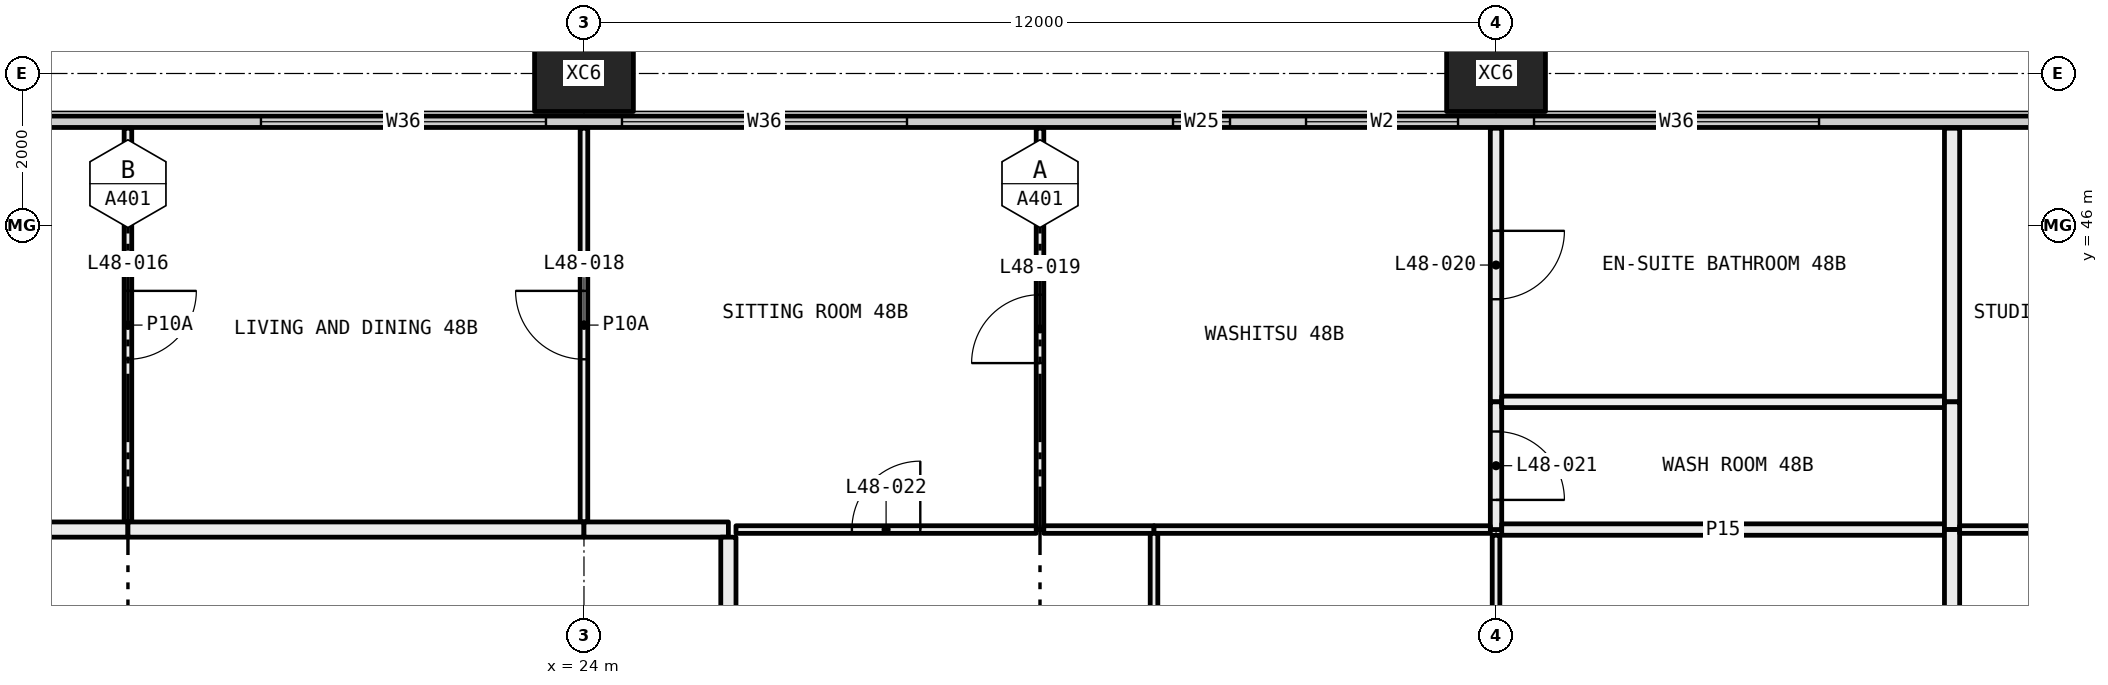
"""IFC4 building model, lengths in metres.
Left out: names, types, materials, properties, quantities, classifications, styles, units other than length and angle.
Written with IfcOpenShell. Run it as: python <this file> out.ifc"""

import sys

from ifc_helpers import new_model, si_unit, direction, frame, frame_2d, origin, origin_2d, place, context, subcontext, project, spatial, rectangle, hollow_rectangle, extrude, element, fill, save


model = new_model("IFC4")
c1 = context("Model", 3, precision=1e-05, world=origin(), true_north=direction((0.0, 1.0)))
c2 = subcontext(c1, "Body", "Model", "MODEL_VIEW")
j1 = project(units=[si_unit("LENGTHUNIT", "METRE"), si_unit("PLANEANGLEUNIT", "RADIAN")], contexts=[c1])
p1 = place(None, origin())
s1 = spatial("IfcSite", under=j1, at=p1, CompositionType="ELEMENT")
p2 = place(p1, origin())
s2 = spatial("IfcBuilding", under=s1, at=p2, CompositionType="ELEMENT")
p3 = place(p2, frame((0.0, 0.0, 182.4)))
s3 = spatial("IfcBuildingStorey", under=s2, at=p3, CompositionType="ELEMENT", Elevation=182.4)
for number, where, z_axis, x_axis in (
    (1, (24.0, 48.0, -0.4), (0.0, 0.0, 1.0), (1.0, 0.0, 0.0)),
    (2, (36.0, 48.0, -0.4), (0.0, 0.0, 1.0), (1.0, 0.0, 0.0)),
):
    element("IfcColumn", number, at=place(p3, frame(where, z_axis=z_axis, x_axis=x_axis)), inside=s3, PredefinedType="COLUMN", context=c2, shape_type="SweptSolid", body=[
        extrude(hollow_rectangle(XDim=1.3, YDim=1.0, WallThickness=0.05, at=origin_2d()), origin(), (0.0, 0.0, 1.0), 3.45),
    ])
p4 = place(p3, frame((6.56, 47.365, 0.0), z_axis=(0.0, 0.0, 1.0), x_axis=(1.0, 0.0, 0.0)))
e3 = element("IfcWall", 3, at=p4, inside=s3, PredefinedType="ELEMENTEDWALL", context=c2, shape_type="SweptSolid", body=[
    extrude(rectangle(XDim=46.88, YDim=0.15, at=frame_2d((23.44, 0.0))), origin(), (0.0, 0.0, 1.0), 3.05),
])
p5 = place(p4, frame((0.44, 0.0, 0.45)))
e4 = element("IfcOpeningElement", 4, at=p5, cuts=e3, PredefinedType="OPENING", context=c2, shape_type="SweptSolid", body=[
    extrude(rectangle(XDim=4.5, YDim=2.55, at=frame_2d((2.25, 1.275))), frame((0.0, 0.085, 0.0), z_axis=(0.0, -1.0, 0.0), x_axis=(1.0, 0.0, 0.0)), (0.0, 0.0, 1.0), 0.17),
])
p6 = place(p4, frame((5.94, 0.0, 0.45)))
e5 = element("IfcOpeningElement", 5, at=p6, cuts=e3, PredefinedType="OPENING", context=c2, shape_type="SweptSolid", body=[
    extrude(rectangle(XDim=3.75, YDim=2.55, at=frame_2d((1.875, 1.275))), frame((0.0, 0.085, 0.0), z_axis=(0.0, -1.0, 0.0), x_axis=(1.0, 0.0, 0.0)), (0.0, 0.0, 1.0), 0.17),
])
p7 = place(p4, frame((13.19, 0.0, 0.45)))
e6 = element("IfcOpeningElement", 6, at=p7, cuts=e3, PredefinedType="OPENING", context=c2, shape_type="SweptSolid", body=[
    extrude(rectangle(XDim=3.75, YDim=2.55, at=frame_2d((1.875, 1.275))), frame((0.0, 0.085, 0.0), z_axis=(0.0, -1.0, 0.0), x_axis=(1.0, 0.0, 0.0)), (0.0, 0.0, 1.0), 0.17),
])
p8 = place(p4, frame((17.94, 0.0, 0.45)))
e7 = element("IfcOpeningElement", 7, at=p8, cuts=e3, PredefinedType="OPENING", context=c2, shape_type="SweptSolid", body=[
    extrude(rectangle(XDim=3.75, YDim=2.55, at=frame_2d((1.875, 1.275))), frame((0.0, 0.085, 0.0), z_axis=(0.0, -1.0, 0.0), x_axis=(1.0, 0.0, 0.0)), (0.0, 0.0, 1.0), 0.17),
])
p9 = place(p4, frame((25.19, 0.0, 0.45)))
e8 = element("IfcOpeningElement", 8, at=p9, cuts=e3, PredefinedType="OPENING", context=c2, shape_type="SweptSolid", body=[
    extrude(rectangle(XDim=0.75, YDim=2.55, at=frame_2d((0.375, 1.275))), frame((0.0, 0.085, 0.0), z_axis=(0.0, -1.0, 0.0), x_axis=(1.0, 0.0, 0.0)), (0.0, 0.0, 1.0), 0.17),
])
p10 = place(p4, frame((26.94, 0.0, 0.45)))
e9 = element("IfcOpeningElement", 9, at=p10, cuts=e3, PredefinedType="OPENING", context=c2, shape_type="SweptSolid", body=[
    extrude(rectangle(XDim=2.0, YDim=2.55, at=frame_2d((1.0, 1.275))), frame((0.0, 0.085, 0.0), z_axis=(0.0, -1.0, 0.0), x_axis=(1.0, 0.0, 0.0)), (0.0, 0.0, 1.0), 0.17),
])
p11 = place(p4, frame((29.94, 0.0, 0.45)))
e10 = element("IfcOpeningElement", 10, at=p11, cuts=e3, PredefinedType="OPENING", context=c2, shape_type="SweptSolid", body=[
    extrude(rectangle(XDim=3.75, YDim=2.55, at=frame_2d((1.875, 1.275))), frame((0.0, 0.085, 0.0), z_axis=(0.0, -1.0, 0.0), x_axis=(1.0, 0.0, 0.0)), (0.0, 0.0, 1.0), 0.17),
])
p12 = place(p4, frame((37.19, 0.0, 0.45)))
e11 = element("IfcOpeningElement", 11, at=p12, cuts=e3, PredefinedType="OPENING", context=c2, shape_type="SweptSolid", body=[
    extrude(rectangle(XDim=3.75, YDim=2.55, at=frame_2d((1.875, 1.275))), frame((0.0, 0.085, 0.0), z_axis=(0.0, -1.0, 0.0), x_axis=(1.0, 0.0, 0.0)), (0.0, 0.0, 1.0), 0.17),
])
p13 = place(p4, frame((41.94, 0.0, 0.45)))
e12 = element("IfcOpeningElement", 12, at=p13, cuts=e3, PredefinedType="OPENING", context=c2, shape_type="SweptSolid", body=[
    extrude(rectangle(XDim=4.5, YDim=2.55, at=frame_2d((2.25, 1.275))), frame((0.0, 0.085, 0.0), z_axis=(0.0, -1.0, 0.0), x_axis=(1.0, 0.0, 0.0)), (0.0, 0.0, 1.0), 0.17),
])
p14 = place(p3, frame((18.0, 42.1, 0.0), z_axis=(0.0, 0.0, 1.0), x_axis=(0.0, 1.0, 0.0)))
e13 = element("IfcWall", 13, at=p14, inside=s3, PredefinedType="PARTITIONING", context=c2, shape_type="SweptSolid", body=[
    extrude(rectangle(XDim=5.18, YDim=0.1, at=frame_2d((2.59, 0.0))), origin(), (0.0, 0.0, 1.0), 3.05),
])
p15 = place(p14, frame((2.14, 0.0, 0.0)))
e14 = element("IfcOpeningElement", 14, at=p15, cuts=e13, PredefinedType="OPENING", context=c2, shape_type="SweptSolid", body=[
    extrude(rectangle(XDim=0.9, YDim=2.1, at=frame_2d((0.45, 1.05))), frame((0.0, 0.06, 0.0), z_axis=(0.0, -1.0, 0.0), x_axis=(1.0, 0.0, 0.0)), (0.0, 0.0, 1.0), 0.12),
])
p16 = place(p3, frame((12.0, 42.0, 0.0), z_axis=(0.0, 0.0, 1.0), x_axis=(1.0, 0.0, 0.0)))
e15 = element("IfcWall", 15, at=p16, inside=s3, PredefinedType="PARTITIONING", context=c2, shape_type="SweptSolid", body=[
    extrude(rectangle(XDim=6.0, YDim=0.2, at=frame_2d((3.0, 0.0))), origin(), (0.0, 0.0, 1.0), 3.05),
])
p17 = place(p16, frame((2.5, 0.0, 0.0)))
e16 = element("IfcOpeningElement", 16, at=p17, cuts=e15, PredefinedType="OPENING", context=c2, shape_type="SweptSolid", body=[
    extrude(rectangle(XDim=1.0, YDim=2.1, at=frame_2d((0.5, 1.05))), frame((0.0, 0.11, 0.0), z_axis=(0.0, -1.0, 0.0), x_axis=(1.0, 0.0, 0.0)), (0.0, 0.0, 1.0), 0.22),
])
p18 = place(p3, frame((24.0, 42.1, 0.0), z_axis=(0.0, 0.0, 1.0), x_axis=(0.0, 1.0, 0.0)))
e17 = element("IfcWall", 17, at=p18, inside=s3, PredefinedType="PARTITIONING", context=c2, shape_type="SweptSolid", body=[
    extrude(rectangle(XDim=5.18, YDim=0.1, at=frame_2d((2.59, 0.0))), origin(), (0.0, 0.0, 1.0), 3.05),
])
p19 = place(p18, frame((2.14, 0.0, 0.0)))
e18 = element("IfcOpeningElement", 18, at=p19, cuts=e17, PredefinedType="OPENING", context=c2, shape_type="SweptSolid", body=[
    extrude(rectangle(XDim=0.9, YDim=2.1, at=frame_2d((0.45, 1.05))), frame((0.0, 0.06, 0.0), z_axis=(0.0, -1.0, 0.0), x_axis=(1.0, 0.0, 0.0)), (0.0, 0.0, 1.0), 0.12),
])
p20 = place(p3, frame((18.0, 42.0, 0.0), z_axis=(0.0, 0.0, 1.0), x_axis=(1.0, 0.0, 0.0)))
e19 = element("IfcWall", 19, at=p20, inside=s3, PredefinedType="PARTITIONING", context=c2, shape_type="SweptSolid", body=[
    extrude(rectangle(XDim=6.0, YDim=0.2, at=frame_2d((3.0, 0.0))), origin(), (0.0, 0.0, 1.0), 3.05),
])
p21 = place(p3, frame((30.0, 42.0, 0.0), z_axis=(0.0, 0.0, 1.0), x_axis=(0.0, 1.0, 0.0)))
e20 = element("IfcWall", 20, at=p21, inside=s3, PredefinedType="PARTITIONING", context=c2, shape_type="SweptSolid", body=[
    extrude(rectangle(XDim=5.28, YDim=0.1, at=frame_2d((2.64, 0.0))), origin(), (0.0, 0.0, 1.0), 3.05),
])
p22 = place(p21, frame((2.19, 0.0, 0.0)))
e21 = element("IfcOpeningElement", 21, at=p22, cuts=e20, PredefinedType="OPENING", context=c2, shape_type="SweptSolid", body=[
    extrude(rectangle(XDim=0.9, YDim=2.1, at=frame_2d((0.45, 1.05))), frame((0.0, 0.06, 0.0), z_axis=(0.0, -1.0, 0.0), x_axis=(1.0, 0.0, 0.0)), (0.0, 0.0, 1.0), 0.12),
])
p23 = place(p3, frame((26.0, 42.0, 0.0), z_axis=(0.0, 0.0, 1.0), x_axis=(1.0, 0.0, 0.0)))
e22 = element("IfcWall", 22, at=p23, inside=s3, PredefinedType="PARTITIONING", context=c2, shape_type="SweptSolid", body=[
    extrude(rectangle(XDim=3.95, YDim=0.1, at=frame_2d((1.975, 0.0))), origin(), (0.0, 0.0, 1.0), 3.05),
])
p24 = place(p23, frame((1.525, 0.0, 0.0)))
e23 = element("IfcOpeningElement", 23, at=p24, cuts=e22, PredefinedType="OPENING", context=c2, shape_type="SweptSolid", body=[
    extrude(rectangle(XDim=0.9, YDim=2.1, at=frame_2d((0.45, 1.05))), frame((0.0, 0.06, 0.0), z_axis=(0.0, -1.0, 0.0), x_axis=(1.0, 0.0, 0.0)), (0.0, 0.0, 1.0), 0.12),
])
p25 = place(p3, frame((24.0, 42.0, 0.0), z_axis=(0.0, 0.0, 1.0), x_axis=(1.0, 0.0, 0.0)))
e24 = element("IfcWall", 24, at=p25, inside=s3, PredefinedType="PARTITIONING", context=c2, shape_type="SweptSolid", body=[
    extrude(rectangle(XDim=1.9, YDim=0.2, at=frame_2d((0.95, 0.0))), origin(), (0.0, 0.0, 1.0), 3.05),
])
p26 = place(p3, frame((36.0, 43.68, 0.0), z_axis=(0.0, 0.0, 1.0), x_axis=(0.0, 1.0, 0.0)))
e25 = element("IfcWall", 25, at=p26, inside=s3, PredefinedType="PARTITIONING", context=c2, shape_type="SweptSolid", body=[
    extrude(rectangle(XDim=3.6, YDim=0.15, at=frame_2d((1.8, 0.0))), origin(), (0.0, 0.0, 1.0), 2.45),
])
p27 = place(p26, frame((1.35, 0.0, 0.0)))
e26 = element("IfcOpeningElement", 26, at=p27, cuts=e25, PredefinedType="OPENING", context=c2, shape_type="SweptSolid", body=[
    extrude(rectangle(XDim=0.9, YDim=2.1, at=frame_2d((0.45, 1.05))), frame((0.0, 0.085, 0.0), z_axis=(0.0, -1.0, 0.0), x_axis=(1.0, 0.0, 0.0)), (0.0, 0.0, 1.0), 0.17),
])
p28 = place(p3, frame((36.0, 42.0, 0.0), z_axis=(0.0, 0.0, 1.0), x_axis=(0.0, 1.0, 0.0)))
e27 = element("IfcWall", 27, at=p28, inside=s3, PredefinedType="PARTITIONING", context=c2, shape_type="SweptSolid", body=[
    extrude(rectangle(XDim=1.68, YDim=0.15, at=frame_2d((0.84, 0.0))), origin(), (0.0, 0.0, 1.0), 2.45),
])
p29 = place(p28, frame((0.39, 0.0, 0.0)))
e28 = element("IfcOpeningElement", 28, at=p29, cuts=e27, PredefinedType="OPENING", context=c2, shape_type="SweptSolid", body=[
    extrude(rectangle(XDim=0.9, YDim=2.1, at=frame_2d((0.45, 1.05))), frame((0.0, 0.085, 0.0), z_axis=(0.0, -1.0, 0.0), x_axis=(1.0, 0.0, 0.0)), (0.0, 0.0, 1.0), 0.17),
])
p30 = place(p3, frame((30.05, 42.0, 0.0), z_axis=(0.0, 0.0, 1.0), x_axis=(1.0, 0.0, 0.0)))
e29 = element("IfcWall", 29, at=p30, inside=s3, PredefinedType="PARTITIONING", context=c2, shape_type="SweptSolid", body=[
    extrude(rectangle(XDim=1.45, YDim=0.1, at=frame_2d((0.725, 0.0))), origin(), (0.0, 0.0, 1.0), 3.05),
])
p31 = place(p3, frame((31.5, 42.0, 0.0), z_axis=(0.0, 0.0, 1.0), x_axis=(1.0, 0.0, 0.0)))
e30 = element("IfcWall", 30, at=p31, inside=s3, PredefinedType="PARTITIONING", context=c2, shape_type="SweptSolid", body=[
    extrude(rectangle(XDim=4.425, YDim=0.1, at=frame_2d((2.212, 0.0))), origin(), (0.0, 0.0, 1.0), 2.45),
])
p32 = place(p3, frame((36.075, 43.68, 0.0), z_axis=(0.0, 0.0, 1.0), x_axis=(1.0, 0.0, 0.0)))
e31 = element("IfcWall", 31, at=p32, inside=s3, PredefinedType="PARTITIONING", context=c2, shape_type="SweptSolid", body=[
    extrude(rectangle(XDim=5.825, YDim=0.15, at=frame_2d((2.913, 0.0))), origin(), (0.0, 0.0, 1.0), 2.45),
])
p33 = place(p3, frame((42.0, 43.68, 0.0), z_axis=(0.0, 0.0, 1.0), x_axis=(0.0, 1.0, 0.0)))
e32 = element("IfcWall", 32, at=p33, inside=s3, PredefinedType="PARTITIONING", context=c2, shape_type="SweptSolid", body=[
    extrude(rectangle(XDim=3.6, YDim=0.2, at=frame_2d((1.8, 0.0))), origin(), (0.0, 0.0, 1.0), 3.05),
])
p34 = place(p3, frame((36.075, 42.0, 0.0), z_axis=(0.0, 0.0, 1.0), x_axis=(1.0, 0.0, 0.0)))
e33 = element("IfcWall", 33, at=p34, inside=s3, PredefinedType="PARTITIONING", context=c2, shape_type="SweptSolid", body=[
    extrude(rectangle(XDim=5.825, YDim=0.15, at=frame_2d((2.913, 0.0))), origin(), (0.0, 0.0, 1.0), 2.45),
])
p35 = place(p3, frame((42.0, 42.0, 0.0), z_axis=(0.0, 0.0, 1.0), x_axis=(0.0, 1.0, 0.0)))
e34 = element("IfcWall", 34, at=p35, inside=s3, PredefinedType="PARTITIONING", context=c2, shape_type="SweptSolid", body=[
    extrude(rectangle(XDim=1.68, YDim=0.2, at=frame_2d((0.84, 0.0))), origin(), (0.0, 0.0, 1.0), 3.05),
])
p36 = place(p3, frame((31.5, 36.1, 0.0), z_axis=(0.0, 0.0, 1.0), x_axis=(0.0, 1.0, 0.0)))
e35 = element("IfcWall", 35, at=p36, inside=s3, PredefinedType="PARTITIONING", context=c2, shape_type="SweptSolid", body=[
    extrude(rectangle(XDim=5.85, YDim=0.1, at=frame_2d((2.925, 0.0))), origin(), (0.0, 0.0, 1.0), 3.05),
])
p37 = place(p36, frame((2.475, 0.0, 0.0)))
e36 = element("IfcOpeningElement", 36, at=p37, cuts=e35, PredefinedType="OPENING", context=c2, shape_type="SweptSolid", body=[
    extrude(rectangle(XDim=0.9, YDim=2.1, at=frame_2d((0.45, 1.05))), frame((0.0, 0.06, 0.0), z_axis=(0.0, -1.0, 0.0), x_axis=(1.0, 0.0, 0.0)), (0.0, 0.0, 1.0), 0.12),
])
p38 = place(p3, frame((25.9, 41.9, 0.0), z_axis=(0.0, 0.0, 1.0), x_axis=(0.0, -1.0, 0.0)))
e37 = element("IfcWall", 37, at=p38, inside=s3, PredefinedType="PARTITIONING", context=c2, shape_type="SweptSolid", body=[
    extrude(rectangle(XDim=6.2, YDim=0.2, at=frame_2d((3.1, 0.0))), origin(), (0.0, 0.0, 1.0), 2.45),
])
p39 = place(p3, frame((36.0, 36.65, 0.0), z_axis=(0.0, 0.0, 1.0), x_axis=(0.0, 1.0, 0.0)))
e38 = element("IfcWall", 38, at=p39, inside=s3, PredefinedType="PARTITIONING", context=c2, shape_type="SweptSolid", body=[
    extrude(rectangle(XDim=5.275, YDim=0.1, at=frame_2d((2.638, 0.0))), origin(), (0.0, 0.0, 1.0), 2.45),
])
p40 = place(p39, frame((2.188, 0.0, 0.0)))
e39 = element("IfcOpeningElement", 39, at=p40, cuts=e38, PredefinedType="OPENING", context=c2, shape_type="SweptSolid", body=[
    extrude(rectangle(XDim=0.9, YDim=2.1, at=frame_2d((0.45, 1.05))), frame((0.0, 0.06, 0.0), z_axis=(0.0, -1.0, 0.0), x_axis=(1.0, 0.0, 0.0)), (0.0, 0.0, 1.0), 0.12),
])
p41 = place(p3, frame((42.0, 36.1, 0.0), z_axis=(0.0, 0.0, 1.0), x_axis=(0.0, 1.0, 0.0)))
e40 = element("IfcWall", 40, at=p41, inside=s3, PredefinedType="PARTITIONING", context=c2, shape_type="SweptSolid", body=[
    extrude(rectangle(XDim=5.9, YDim=0.2, at=frame_2d((2.95, 0.0))), origin(), (0.0, 0.0, 1.0), 3.05),
])
p42 = place(p3, frame((42.1, 42.0, 0.0), z_axis=(0.0, 0.0, 1.0), x_axis=(1.0, 0.0, 0.0)))
e41 = element("IfcWall", 41, at=p42, inside=s3, PredefinedType="PARTITIONING", context=c2, shape_type="SweptSolid", body=[
    extrude(rectangle(XDim=3.9, YDim=0.1, at=frame_2d((1.95, 0.0))), origin(), (0.0, 0.0, 1.0), 3.05),
])
p43 = place(p42, frame((1.5, 0.0, 0.0)))
e42 = element("IfcOpeningElement", 42, at=p43, cuts=e41, PredefinedType="OPENING", context=c2, shape_type="SweptSolid", body=[
    extrude(rectangle(XDim=0.9, YDim=2.1, at=frame_2d((0.45, 1.05))), frame((0.0, 0.06, 0.0), z_axis=(0.0, -1.0, 0.0), x_axis=(1.0, 0.0, 0.0)), (0.0, 0.0, 1.0), 0.12),
])
p44 = place(p7, origin())
e43 = element("IfcWindow", 43, at=p44, inside=s3, PartitioningType="SINGLE_PANEL", PredefinedType="WINDOW", context=c2, shape_type="SweptSolid", body=[
    extrude(rectangle(XDim=3.75, YDim=2.55, at=frame_2d((1.875, 1.275))), frame((0.0, 0.03, 0.0), z_axis=(0.0, -1.0, 0.0), x_axis=(1.0, 0.0, 0.0)), (0.0, 0.0, 1.0), 0.06),
])
fill(e6, e43)
p45 = place(p8, origin())
e44 = element("IfcWindow", 44, at=p45, inside=s3, PartitioningType="SINGLE_PANEL", PredefinedType="WINDOW", context=c2, shape_type="SweptSolid", body=[
    extrude(rectangle(XDim=3.75, YDim=2.55, at=frame_2d((1.875, 1.275))), frame((0.0, 0.03, 0.0), z_axis=(0.0, -1.0, 0.0), x_axis=(1.0, 0.0, 0.0)), (0.0, 0.0, 1.0), 0.06),
])
fill(e7, e44)
p46 = place(p9, origin())
e45 = element("IfcWindow", 45, at=p46, inside=s3, PartitioningType="SINGLE_PANEL", PredefinedType="WINDOW", context=c2, shape_type="SweptSolid", body=[
    extrude(rectangle(XDim=0.75, YDim=2.55, at=frame_2d((0.375, 1.275))), frame((0.0, 0.03, 0.0), z_axis=(0.0, -1.0, 0.0), x_axis=(1.0, 0.0, 0.0)), (0.0, 0.0, 1.0), 0.06),
])
fill(e8, e45)
p47 = place(p10, origin())
e46 = element("IfcWindow", 46, at=p47, inside=s3, PartitioningType="SINGLE_PANEL", PredefinedType="WINDOW", context=c2, shape_type="SweptSolid", body=[
    extrude(rectangle(XDim=2.0, YDim=2.55, at=frame_2d((1.0, 1.275))), frame((0.0, 0.03, 0.0), z_axis=(0.0, -1.0, 0.0), x_axis=(1.0, 0.0, 0.0)), (0.0, 0.0, 1.0), 0.06),
])
fill(e9, e46)
p48 = place(p11, origin())
e47 = element("IfcWindow", 47, at=p48, inside=s3, PartitioningType="SINGLE_PANEL", PredefinedType="WINDOW", context=c2, shape_type="SweptSolid", body=[
    extrude(rectangle(XDim=3.75, YDim=2.55, at=frame_2d((1.875, 1.275))), frame((0.0, 0.03, 0.0), z_axis=(0.0, -1.0, 0.0), x_axis=(1.0, 0.0, 0.0)), (0.0, 0.0, 1.0), 0.06),
])
fill(e10, e47)
p49 = place(p15, frame((0.9, 0.0, 0.0), x_axis=(-1.0, 0.0, 0.0)))
e48 = element("IfcDoor", 48, at=p49, inside=s3, OperationType="SINGLE_SWING_RIGHT", PredefinedType="DOOR", context=c2, shape_type="SweptSolid", body=[
    extrude(rectangle(XDim=0.9, YDim=2.1, at=frame_2d((0.45, 1.05))), frame((0.0, 0.025, 0.0), z_axis=(0.0, -1.0, 0.0), x_axis=(1.0, 0.0, 0.0)), (0.0, 0.0, 1.0), 0.05),
])
fill(e14, e48)
p50 = place(p19, origin())
e49 = element("IfcDoor", 49, at=p50, inside=s3, OperationType="SINGLE_SWING_LEFT", PredefinedType="DOOR", context=c2, shape_type="SweptSolid", body=[
    extrude(rectangle(XDim=0.9, YDim=2.1, at=frame_2d((0.45, 1.05))), frame((0.0, 0.025, 0.0), z_axis=(0.0, -1.0, 0.0), x_axis=(1.0, 0.0, 0.0)), (0.0, 0.0, 1.0), 0.05),
])
fill(e18, e49)
p51 = place(p22, origin())
e50 = element("IfcDoor", 50, at=p51, inside=s3, OperationType="SINGLE_SWING_RIGHT", PredefinedType="DOOR", context=c2, shape_type="SweptSolid", body=[
    extrude(rectangle(XDim=0.9, YDim=2.1, at=frame_2d((0.45, 1.05))), frame((0.0, 0.025, 0.0), z_axis=(0.0, -1.0, 0.0), x_axis=(1.0, 0.0, 0.0)), (0.0, 0.0, 1.0), 0.05),
])
fill(e21, e50)
p52 = place(p27, frame((0.9, 0.0, 0.0), x_axis=(-1.0, 0.0, 0.0)))
e51 = element("IfcDoor", 51, at=p52, inside=s3, OperationType="SINGLE_SWING_RIGHT", PredefinedType="DOOR", context=c2, shape_type="SweptSolid", body=[
    extrude(rectangle(XDim=0.9, YDim=2.1, at=frame_2d((0.45, 1.05))), frame((0.0, 0.025, 0.0), z_axis=(0.0, -1.0, 0.0), x_axis=(1.0, 0.0, 0.0)), (0.0, 0.0, 1.0), 0.05),
])
fill(e26, e51)
p53 = place(p29, frame((0.9, 0.0, 0.0), x_axis=(-1.0, 0.0, 0.0)))
e52 = element("IfcDoor", 52, at=p53, inside=s3, OperationType="SINGLE_SWING_LEFT", PredefinedType="DOOR", context=c2, shape_type="SweptSolid", body=[
    extrude(rectangle(XDim=0.9, YDim=2.1, at=frame_2d((0.45, 1.05))), frame((0.0, 0.025, 0.0), z_axis=(0.0, -1.0, 0.0), x_axis=(1.0, 0.0, 0.0)), (0.0, 0.0, 1.0), 0.05),
])
fill(e28, e52)
p54 = place(p24, origin())
e53 = element("IfcDoor", 53, at=p54, inside=s3, OperationType="SINGLE_SWING_LEFT", PredefinedType="DOOR", context=c2, shape_type="SweptSolid", body=[
    extrude(rectangle(XDim=0.9, YDim=2.1, at=frame_2d((0.45, 1.05))), frame((0.0, 0.025, 0.0), z_axis=(0.0, -1.0, 0.0), x_axis=(1.0, 0.0, 0.0)), (0.0, 0.0, 1.0), 0.05),
])
fill(e23, e53)
save(model, sys.argv[1])
